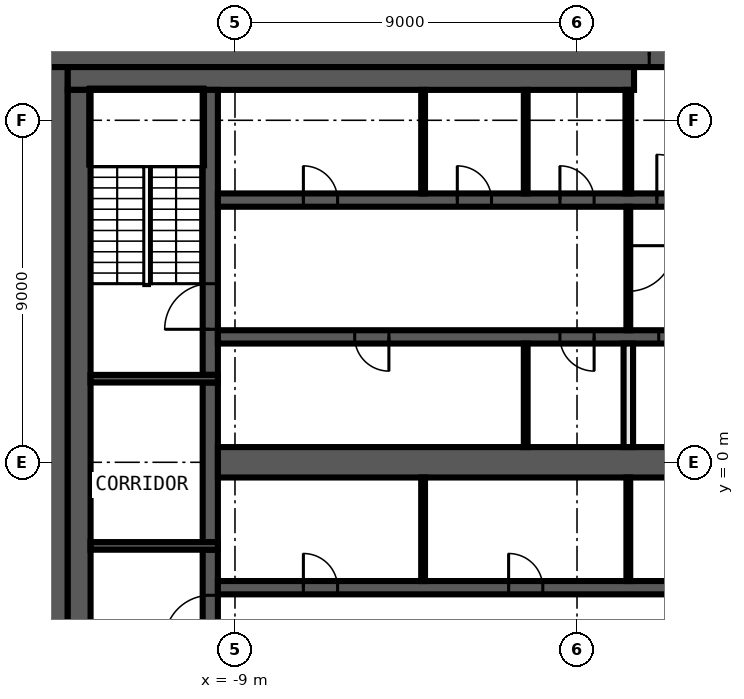
"""IFC4 building model, lengths in metres.
Left out: names, types, materials, properties, quantities, classifications, styles, units other than length and angle.
Written with IfcOpenShell. Run it as: python <this file> out.ifc"""

import sys

from ifc_helpers import new_model, si_unit, direction, frame, frame_2d, origin, place, context, subcontext, project, spatial, rectangle, extrude, element, fill, save


model = new_model("IFC4")
c1 = context("Model", 3, precision=1e-05, world=origin(), true_north=direction((0.0, 1.0)))
c2 = subcontext(c1, "Body", "Model", "MODEL_VIEW")
j1 = project(units=[si_unit("LENGTHUNIT", "METRE"), si_unit("PLANEANGLEUNIT", "RADIAN")], contexts=[c1])
p1 = place(None, origin())
s1 = spatial("IfcSite", under=j1, at=p1, CompositionType="ELEMENT")
p2 = place(p1, origin())
s2 = spatial("IfcBuilding", under=s1, at=p2, CompositionType="ELEMENT")
p3 = place(p2, frame((0.0, 0.0, 319.4)))
s3 = spatial("IfcBuildingStorey", under=s2, at=p3, CompositionType="ELEMENT", Elevation=319.4)
p4 = place(p3, frame((-14.0, 10.7, 0.0), z_axis=(0.0, 0.0, 1.0), x_axis=(1.0, 0.0, 0.0)))
e1 = element("IfcWall", 1, at=p4, inside=s3, PredefinedType="SHEAR", context=c2, shape_type="SweptSolid", body=[
    extrude(rectangle(XDim=28.0, YDim=0.6, at=frame_2d((14.0, 0.0))), origin(), (0.0, 0.0, 1.0), 3.82),
])
p5 = place(p4, frame((15.9, 0.0, 0.0)))
e2 = element("IfcOpeningElement", 2, at=p5, cuts=e1, PredefinedType="OPENING", context=c2, shape_type="SweptSolid", body=[
    extrude(rectangle(XDim=1.6, YDim=2.1, at=frame_2d((0.8, 1.05))), frame((0.0, 0.31, 0.0), z_axis=(0.0, -1.0, 0.0), x_axis=(1.0, 0.0, 0.0)), (0.0, 0.0, 1.0), 0.62),
])
p6 = place(p3, frame((-13.7, -10.4, 0.0), z_axis=(0.0, 0.0, 1.0), x_axis=(0.0, 1.0, 0.0)))
e3 = element("IfcWall", 3, at=p6, inside=s3, PredefinedType="SHEAR", context=c2, shape_type="SweptSolid", body=[
    extrude(rectangle(XDim=20.8, YDim=0.6, at=frame_2d((10.4, 0.0))), origin(), (0.0, 0.0, 1.0), 3.82),
])
p7 = place(p3, frame((-13.4, 10.1, 0.0), z_axis=(0.0, 0.0, 1.0), x_axis=(1.0, 0.0, 0.0)))
e4 = element("IfcWall", 4, at=p7, inside=s3, PredefinedType="SHEAR", context=c2, shape_type="SweptSolid", body=[
    extrude(rectangle(XDim=14.9, YDim=0.6, at=frame_2d((7.45, 0.0))), origin(), (0.0, 0.0, 1.0), 3.82),
])
p8 = place(p3, frame((-13.1, -9.8, 0.0), z_axis=(0.0, 0.0, 1.0), x_axis=(0.0, 1.0, 0.0)))
e5 = element("IfcWall", 5, at=p8, inside=s3, PredefinedType="SHEAR", context=c2, shape_type="SweptSolid", body=[
    extrude(rectangle(XDim=19.6, YDim=0.6, at=frame_2d((9.8, 0.0))), origin(), (0.0, 0.0, 1.0), 3.82),
])
p9 = place(p3, frame((-9.65, -9.8, 0.0), z_axis=(0.0, 0.0, 1.0), x_axis=(0.0, 1.0, 0.0)))
e6 = element("IfcWall", 6, at=p9, inside=s3, PredefinedType="SHEAR", context=c2, shape_type="SweptSolid", body=[
    extrude(rectangle(XDim=7.5, YDim=0.4, at=frame_2d((3.75, 0.0))), origin(), (0.0, 0.0, 1.0), 3.82),
])
p10 = place(p9, frame((5.1, 0.0, 0.0)))
e7 = element("IfcOpeningElement", 7, at=p10, cuts=e6, PredefinedType="OPENING", context=c2, shape_type="SweptSolid", body=[
    extrude(rectangle(XDim=1.2, YDim=2.1, at=frame_2d((0.6, 1.05))), frame((0.0, 0.21, 0.0), z_axis=(0.0, -1.0, 0.0), x_axis=(1.0, 0.0, 0.0)), (0.0, 0.0, 1.0), 0.42),
])
p11 = place(p3, frame((-9.65, -2.1, 0.0), z_axis=(0.0, 0.0, 1.0), x_axis=(0.0, 1.0, 0.0)))
e8 = element("IfcWall", 8, at=p11, inside=s3, PredefinedType="SHEAR", context=c2, shape_type="SweptSolid", body=[
    extrude(rectangle(XDim=4.2, YDim=0.4, at=frame_2d((2.1, 0.0))), origin(), (0.0, 0.0, 1.0), 3.82),
])
p12 = place(p3, frame((-9.65, 2.3, 0.0), z_axis=(0.0, 0.0, 1.0), x_axis=(0.0, 1.0, 0.0)))
e9 = element("IfcWall", 9, at=p12, inside=s3, PredefinedType="SHEAR", context=c2, shape_type="SweptSolid", body=[
    extrude(rectangle(XDim=7.5, YDim=0.4, at=frame_2d((3.75, 0.0))), origin(), (0.0, 0.0, 1.0), 3.82),
])
p13 = place(p12, frame((1.2, 0.0, 0.0)))
e10 = element("IfcOpeningElement", 10, at=p13, cuts=e9, PredefinedType="OPENING", context=c2, shape_type="SweptSolid", body=[
    extrude(rectangle(XDim=1.2, YDim=2.1, at=frame_2d((0.6, 1.05))), frame((0.0, 0.21, 0.0), z_axis=(0.0, -1.0, 0.0), x_axis=(1.0, 0.0, 0.0)), (0.0, 0.0, 1.0), 0.42),
])
for number, where, z_axis, x_axis in (
    (11, (-9.45, 2.2, 0.0), (0.0, 0.0, 1.0), (-1.0, 0.0, 0.0)),
    (12, (-9.45, -2.2, 0.0), (0.0, 0.0, 1.0), (-1.0, 0.0, 0.0)),
):
    element("IfcWall", number, at=place(p3, frame(where, z_axis=z_axis, x_axis=x_axis)), inside=s3, PredefinedType="SHEAR", context=c2, shape_type="SweptSolid", body=[
        extrude(rectangle(XDim=3.35, YDim=0.2, at=frame_2d((1.675, 0.0))), origin(), (0.0, 0.0, 1.0), 3.82),
    ])
p14 = place(p3, frame((-9.45, 6.9, 0.0), z_axis=(0.0, 0.0, 1.0), x_axis=(1.0, 0.0, 0.0)))
e13 = element("IfcWall", 13, at=p14, inside=s3, PredefinedType="SHEAR", context=c2, shape_type="SweptSolid", body=[
    extrude(rectangle(XDim=18.9, YDim=0.35, at=frame_2d((9.45, 0.0))), origin(), (0.0, 0.0, 1.0), 3.82),
])
p15 = place(p14, frame((11.55, 0.0, 0.0)))
e14 = element("IfcOpeningElement", 14, at=p15, cuts=e13, PredefinedType="OPENING", context=c2, shape_type="SweptSolid", body=[
    extrude(rectangle(XDim=1.2, YDim=2.1, at=frame_2d((0.6, 1.05))), frame((0.0, 0.185, 0.0), z_axis=(0.0, -1.0, 0.0), x_axis=(1.0, 0.0, 0.0)), (0.0, 0.0, 1.0), 0.37),
])
p16 = place(p14, frame((14.3, 0.0, 0.0)))
e15 = element("IfcOpeningElement", 15, at=p16, cuts=e13, PredefinedType="OPENING", context=c2, shape_type="SweptSolid", body=[
    extrude(rectangle(XDim=1.1, YDim=2.1, at=frame_2d((0.55, 1.05))), frame((0.0, 0.185, 0.0), z_axis=(0.0, -1.0, 0.0), x_axis=(1.0, 0.0, 0.0)), (0.0, 0.0, 1.0), 0.37),
])
p17 = place(p14, frame((17.0, 0.0, 0.0)))
e16 = element("IfcOpeningElement", 16, at=p17, cuts=e13, PredefinedType="OPENING", context=c2, shape_type="SweptSolid", body=[
    extrude(rectangle(XDim=1.1, YDim=2.1, at=frame_2d((0.55, 1.05))), frame((0.0, 0.185, 0.0), z_axis=(0.0, -1.0, 0.0), x_axis=(1.0, 0.0, 0.0)), (0.0, 0.0, 1.0), 0.37),
])
p18 = place(p14, frame((2.25, 0.0, 0.0)))
e17 = element("IfcOpeningElement", 17, at=p18, cuts=e13, PredefinedType="OPENING", context=c2, shape_type="SweptSolid", body=[
    extrude(rectangle(XDim=0.9, YDim=2.1, at=frame_2d((0.45, 1.05))), frame((0.0, 0.185, 0.0), z_axis=(0.0, -1.0, 0.0), x_axis=(1.0, 0.0, 0.0)), (0.0, 0.0, 1.0), 0.37),
])
p19 = place(p14, frame((6.3, 0.0, 0.0)))
e18 = element("IfcOpeningElement", 18, at=p19, cuts=e13, PredefinedType="OPENING", context=c2, shape_type="SweptSolid", body=[
    extrude(rectangle(XDim=0.9, YDim=2.1, at=frame_2d((0.45, 1.05))), frame((0.0, 0.185, 0.0), z_axis=(0.0, -1.0, 0.0), x_axis=(1.0, 0.0, 0.0)), (0.0, 0.0, 1.0), 0.37),
])
p20 = place(p14, frame((9.0, 0.0, 0.0)))
e19 = element("IfcOpeningElement", 19, at=p20, cuts=e13, PredefinedType="OPENING", context=c2, shape_type="SweptSolid", body=[
    extrude(rectangle(XDim=0.9, YDim=2.1, at=frame_2d((0.45, 1.05))), frame((0.0, 0.185, 0.0), z_axis=(0.0, -1.0, 0.0), x_axis=(1.0, 0.0, 0.0)), (0.0, 0.0, 1.0), 0.37),
])
p21 = place(p3, frame((9.45, 3.3, 0.0), z_axis=(0.0, 0.0, 1.0), x_axis=(-1.0, 0.0, 0.0)))
e20 = element("IfcWall", 20, at=p21, inside=s3, PredefinedType="SHEAR", context=c2, shape_type="SweptSolid", body=[
    extrude(rectangle(XDim=18.9, YDim=0.35, at=frame_2d((9.45, 0.0))), origin(), (0.0, 0.0, 1.0), 3.82),
])
p22 = place(p21, frame((6.2, 0.0, 0.0)))
e21 = element("IfcOpeningElement", 21, at=p22, cuts=e20, PredefinedType="OPENING", context=c2, shape_type="SweptSolid", body=[
    extrude(rectangle(XDim=1.1, YDim=2.1, at=frame_2d((0.55, 1.05))), frame((0.0, 0.185, 0.0), z_axis=(0.0, -1.0, 0.0), x_axis=(1.0, 0.0, 0.0)), (0.0, 0.0, 1.0), 0.37),
])
p23 = place(p21, frame((3.5, 0.0, 0.0)))
e22 = element("IfcOpeningElement", 22, at=p23, cuts=e20, PredefinedType="OPENING", context=c2, shape_type="SweptSolid", body=[
    extrude(rectangle(XDim=1.1, YDim=2.1, at=frame_2d((0.55, 1.05))), frame((0.0, 0.185, 0.0), z_axis=(0.0, -1.0, 0.0), x_axis=(1.0, 0.0, 0.0)), (0.0, 0.0, 1.0), 0.37),
])
p24 = place(p21, frame((0.9, 0.0, 0.0)))
e23 = element("IfcOpeningElement", 23, at=p24, cuts=e20, PredefinedType="OPENING", context=c2, shape_type="SweptSolid", body=[
    extrude(rectangle(XDim=0.9, YDim=2.1, at=frame_2d((0.45, 1.05))), frame((0.0, 0.185, 0.0), z_axis=(0.0, -1.0, 0.0), x_axis=(1.0, 0.0, 0.0)), (0.0, 0.0, 1.0), 0.37),
])
p25 = place(p21, frame((14.4, 0.0, 0.0)))
e24 = element("IfcOpeningElement", 24, at=p25, cuts=e20, PredefinedType="OPENING", context=c2, shape_type="SweptSolid", body=[
    extrude(rectangle(XDim=0.9, YDim=2.1, at=frame_2d((0.45, 1.05))), frame((0.0, 0.185, 0.0), z_axis=(0.0, -1.0, 0.0), x_axis=(1.0, 0.0, 0.0)), (0.0, 0.0, 1.0), 0.37),
])
p26 = place(p21, frame((9.0, 0.0, 0.0)))
e25 = element("IfcOpeningElement", 25, at=p26, cuts=e20, PredefinedType="OPENING", context=c2, shape_type="SweptSolid", body=[
    extrude(rectangle(XDim=0.9, YDim=2.1, at=frame_2d((0.45, 1.05))), frame((0.0, 0.185, 0.0), z_axis=(0.0, -1.0, 0.0), x_axis=(1.0, 0.0, 0.0)), (0.0, 0.0, 1.0), 0.37),
])
p27 = place(p3, frame((-9.45, -3.3, 0.0), z_axis=(0.0, 0.0, 1.0), x_axis=(1.0, 0.0, 0.0)))
e26 = element("IfcWall", 26, at=p27, inside=s3, PredefinedType="SHEAR", context=c2, shape_type="SweptSolid", body=[
    extrude(rectangle(XDim=18.9, YDim=0.35, at=frame_2d((9.45, 0.0))), origin(), (0.0, 0.0, 1.0), 3.82),
])
p28 = place(p27, frame((17.0, 0.0, 0.0)))
e27 = element("IfcOpeningElement", 27, at=p28, cuts=e26, PredefinedType="OPENING", context=c2, shape_type="SweptSolid", body=[
    extrude(rectangle(XDim=1.1, YDim=2.1, at=frame_2d((0.55, 1.05))), frame((0.0, 0.185, 0.0), z_axis=(0.0, -1.0, 0.0), x_axis=(1.0, 0.0, 0.0)), (0.0, 0.0, 1.0), 0.37),
])
p29 = place(p27, frame((2.25, 0.0, 0.0)))
e28 = element("IfcOpeningElement", 28, at=p29, cuts=e26, PredefinedType="OPENING", context=c2, shape_type="SweptSolid", body=[
    extrude(rectangle(XDim=0.9, YDim=2.1, at=frame_2d((0.45, 1.05))), frame((0.0, 0.185, 0.0), z_axis=(0.0, -1.0, 0.0), x_axis=(1.0, 0.0, 0.0)), (0.0, 0.0, 1.0), 0.37),
])
p30 = place(p27, frame((7.65, 0.0, 0.0)))
e29 = element("IfcOpeningElement", 29, at=p30, cuts=e26, PredefinedType="OPENING", context=c2, shape_type="SweptSolid", body=[
    extrude(rectangle(XDim=0.9, YDim=2.1, at=frame_2d((0.45, 1.05))), frame((0.0, 0.185, 0.0), z_axis=(0.0, -1.0, 0.0), x_axis=(1.0, 0.0, 0.0)), (0.0, 0.0, 1.0), 0.37),
])
p31 = place(p27, frame((13.05, 0.0, 0.0)))
e30 = element("IfcOpeningElement", 30, at=p31, cuts=e26, PredefinedType="OPENING", context=c2, shape_type="SweptSolid", body=[
    extrude(rectangle(XDim=0.9, YDim=2.1, at=frame_2d((0.45, 1.05))), frame((0.0, 0.185, 0.0), z_axis=(0.0, -1.0, 0.0), x_axis=(1.0, 0.0, 0.0)), (0.0, 0.0, 1.0), 0.37),
])
p32 = place(p3, frame((-9.45, 0.0, 0.0), z_axis=(0.0, 0.0, 1.0), x_axis=(1.0, 0.0, 0.0)))
e31 = element("IfcWall", 31, at=p32, inside=s3, PredefinedType="SHEAR", context=c2, shape_type="SweptSolid", body=[
    extrude(rectangle(XDim=18.9, YDim=0.8, at=frame_2d((9.45, 0.0))), origin(), (0.0, 0.0, 1.0), 3.82),
])
p33 = place(p3, frame((1.35, 7.075, 0.0), z_axis=(0.0, 0.0, 1.0), x_axis=(0.0, 1.0, 0.0)))
e32 = element("IfcWall", 32, at=p33, inside=s3, PredefinedType="PARTITIONING", context=c2, shape_type="SweptSolid", body=[
    extrude(rectangle(XDim=2.725, YDim=0.15, at=frame_2d((1.363, 0.0))), origin(), (0.0, 0.0, 1.0), 3.82),
])
p34 = place(p3, frame((1.35, -3.125, 0.0), z_axis=(0.0, 0.0, 1.0), x_axis=(0.0, 1.0, 0.0)))
e33 = element("IfcWall", 33, at=p34, inside=s3, PredefinedType="PARTITIONING", context=c2, shape_type="SweptSolid", body=[
    extrude(rectangle(XDim=2.725, YDim=0.1, at=frame_2d((1.363, 0.0))), origin(), (0.0, 0.0, 1.0), 3.82),
])
p35 = place(p3, frame((1.35, 6.725, 0.0), z_axis=(0.0, 0.0, 1.0), x_axis=(0.0, -1.0, 0.0)))
e34 = element("IfcWall", 34, at=p35, inside=s3, PredefinedType="PARTITIONING", context=c2, shape_type="SweptSolid", body=[
    extrude(rectangle(XDim=3.25, YDim=0.1, at=frame_2d((1.625, 0.0))), origin(), (0.0, 0.0, 1.0), 3.82),
])
p36 = place(p35, frame((1.025, 0.0, 0.0)))
e35 = element("IfcOpeningElement", 35, at=p36, cuts=e34, PredefinedType="OPENING", context=c2, shape_type="SweptSolid", body=[
    extrude(rectangle(XDim=1.2, YDim=2.1, at=frame_2d((0.6, 1.05))), frame((0.0, 0.06, 0.0), z_axis=(0.0, -1.0, 0.0), x_axis=(1.0, 0.0, 0.0)), (0.0, 0.0, 1.0), 0.12),
])
p37 = place(p3, frame((1.35, 0.4, 0.0), z_axis=(0.0, 0.0, 1.0), x_axis=(0.0, 1.0, 0.0)))
e36 = element("IfcWall", 36, at=p37, inside=s3, PredefinedType="SOLIDWALL", context=c2, shape_type="SweptSolid", body=[
    extrude(rectangle(XDim=2.725, YDim=0.25, at=frame_2d((1.363, 0.0))), origin(), (0.0, 0.0, 1.0), 3.82),
])
for number, where, z_axis, x_axis in (
    (37, (-1.35, 0.4, 0.0), (0.0, 0.0, 1.0), (0.0, 1.0, 0.0)),
    (38, (-1.35, 7.075, 0.0), (0.0, 0.0, 1.0), (0.0, 1.0, 0.0)),
    (39, (-4.05, -3.125, 0.0), (0.0, 0.0, 1.0), (0.0, 1.0, 0.0)),
    (40, (-4.05, 7.075, 0.0), (0.0, 0.0, 1.0), (0.0, 1.0, 0.0)),
):
    element("IfcWall", number, at=place(p3, frame(where, z_axis=z_axis, x_axis=x_axis)), inside=s3, PredefinedType="PARTITIONING", context=c2, shape_type="SweptSolid", body=[
        extrude(rectangle(XDim=2.725, YDim=0.1, at=frame_2d((1.363, 0.0))), origin(), (0.0, 0.0, 1.0), 3.82),
    ])
p38 = place(p5, origin())
e41 = element("IfcDoor", 41, at=p38, inside=s3, OperationType="DOUBLE_DOOR_SINGLE_SWING", PredefinedType="DOOR", context=c2, shape_type="SweptSolid", body=[
    extrude(rectangle(XDim=1.6, YDim=2.1, at=frame_2d((0.8, 1.05))), frame((0.0, 0.025, 0.0), z_axis=(0.0, -1.0, 0.0), x_axis=(1.0, 0.0, 0.0)), (0.0, 0.0, 1.0), 0.05),
])
fill(e2, e41)
p39 = place(p15, origin())
e42 = element("IfcDoor", 42, at=p39, inside=s3, OperationType="SINGLE_SWING_LEFT", PredefinedType="DOOR", context=c2, shape_type="SweptSolid", body=[
    extrude(rectangle(XDim=1.2, YDim=2.1, at=frame_2d((0.6, 1.05))), frame((0.0, 0.025, 0.0), z_axis=(0.0, -1.0, 0.0), x_axis=(1.0, 0.0, 0.0)), (0.0, 0.0, 1.0), 0.05),
])
fill(e14, e42)
p40 = place(p22, origin())
e43 = element("IfcDoor", 43, at=p40, inside=s3, OperationType="DOUBLE_DOOR_SLIDING", PredefinedType="DOOR", context=c2, shape_type="SweptSolid", body=[
    extrude(rectangle(XDim=1.1, YDim=2.1, at=frame_2d((0.55, 1.05))), frame((0.0, 0.025, 0.0), z_axis=(0.0, -1.0, 0.0), x_axis=(1.0, 0.0, 0.0)), (0.0, 0.0, 1.0), 0.05),
])
fill(e21, e43)
p41 = place(p18, origin())
e44 = element("IfcDoor", 44, at=p41, inside=s3, OperationType="SINGLE_SWING_RIGHT", PredefinedType="DOOR", context=c2, shape_type="SweptSolid", body=[
    extrude(rectangle(XDim=0.9, YDim=2.1, at=frame_2d((0.45, 1.05))), frame((0.0, 0.025, 0.0), z_axis=(0.0, -1.0, 0.0), x_axis=(1.0, 0.0, 0.0)), (0.0, 0.0, 1.0), 0.05),
])
fill(e17, e44)
p42 = place(p19, origin())
e45 = element("IfcDoor", 45, at=p42, inside=s3, OperationType="SINGLE_SWING_LEFT", PredefinedType="DOOR", context=c2, shape_type="SweptSolid", body=[
    extrude(rectangle(XDim=0.9, YDim=2.1, at=frame_2d((0.45, 1.05))), frame((0.0, 0.025, 0.0), z_axis=(0.0, -1.0, 0.0), x_axis=(1.0, 0.0, 0.0)), (0.0, 0.0, 1.0), 0.05),
])
fill(e18, e45)
p43 = place(p20, origin())
e46 = element("IfcDoor", 46, at=p43, inside=s3, OperationType="SINGLE_SWING_RIGHT", PredefinedType="DOOR", context=c2, shape_type="SweptSolid", body=[
    extrude(rectangle(XDim=0.9, YDim=2.1, at=frame_2d((0.45, 1.05))), frame((0.0, 0.025, 0.0), z_axis=(0.0, -1.0, 0.0), x_axis=(1.0, 0.0, 0.0)), (0.0, 0.0, 1.0), 0.05),
])
fill(e19, e46)
p44 = place(p25, origin())
e47 = element("IfcDoor", 47, at=p44, inside=s3, OperationType="SINGLE_SWING_LEFT", PredefinedType="DOOR", context=c2, shape_type="SweptSolid", body=[
    extrude(rectangle(XDim=0.9, YDim=2.1, at=frame_2d((0.45, 1.05))), frame((0.0, 0.025, 0.0), z_axis=(0.0, -1.0, 0.0), x_axis=(1.0, 0.0, 0.0)), (0.0, 0.0, 1.0), 0.05),
])
fill(e24, e47)
p45 = place(p26, origin())
e48 = element("IfcDoor", 48, at=p45, inside=s3, OperationType="SINGLE_SWING_RIGHT", PredefinedType="DOOR", context=c2, shape_type="SweptSolid", body=[
    extrude(rectangle(XDim=0.9, YDim=2.1, at=frame_2d((0.45, 1.05))), frame((0.0, 0.025, 0.0), z_axis=(0.0, -1.0, 0.0), x_axis=(1.0, 0.0, 0.0)), (0.0, 0.0, 1.0), 0.05),
])
fill(e25, e48)
p46 = place(p29, origin())
e49 = element("IfcDoor", 49, at=p46, inside=s3, OperationType="SINGLE_SWING_LEFT", PredefinedType="DOOR", context=c2, shape_type="SweptSolid", body=[
    extrude(rectangle(XDim=0.9, YDim=2.1, at=frame_2d((0.45, 1.05))), frame((0.0, 0.025, 0.0), z_axis=(0.0, -1.0, 0.0), x_axis=(1.0, 0.0, 0.0)), (0.0, 0.0, 1.0), 0.05),
])
fill(e28, e49)
p47 = place(p30, origin())
e50 = element("IfcDoor", 50, at=p47, inside=s3, OperationType="SINGLE_SWING_RIGHT", PredefinedType="DOOR", context=c2, shape_type="SweptSolid", body=[
    extrude(rectangle(XDim=0.9, YDim=2.1, at=frame_2d((0.45, 1.05))), frame((0.0, 0.025, 0.0), z_axis=(0.0, -1.0, 0.0), x_axis=(1.0, 0.0, 0.0)), (0.0, 0.0, 1.0), 0.05),
])
fill(e29, e50)
p48 = place(p13, origin())
e51 = element("IfcDoor", 51, at=p48, inside=s3, OperationType="SINGLE_SWING_RIGHT", PredefinedType="DOOR", context=c2, shape_type="SweptSolid", body=[
    extrude(rectangle(XDim=1.2, YDim=2.1, at=frame_2d((0.6, 1.05))), frame((0.0, 0.025, 0.0), z_axis=(0.0, -1.0, 0.0), x_axis=(1.0, 0.0, 0.0)), (0.0, 0.0, 1.0), 0.05),
])
fill(e10, e51)
p49 = place(p10, origin())
e52 = element("IfcDoor", 52, at=p49, inside=s3, OperationType="SINGLE_SWING_LEFT", PredefinedType="DOOR", context=c2, shape_type="SweptSolid", body=[
    extrude(rectangle(XDim=1.2, YDim=2.1, at=frame_2d((0.6, 1.05))), frame((0.0, 0.025, 0.0), z_axis=(0.0, -1.0, 0.0), x_axis=(1.0, 0.0, 0.0)), (0.0, 0.0, 1.0), 0.05),
])
fill(e7, e52)
p50 = place(p36, origin())
e53 = element("IfcDoor", 53, at=p50, inside=s3, OperationType="SINGLE_SWING_LEFT", PredefinedType="DOOR", context=c2, shape_type="SweptSolid", body=[
    extrude(rectangle(XDim=1.2, YDim=2.1, at=frame_2d((0.6, 1.05))), frame((0.0, 0.025, 0.0), z_axis=(0.0, -1.0, 0.0), x_axis=(1.0, 0.0, 0.0)), (0.0, 0.0, 1.0), 0.05),
])
fill(e35, e53)
save(model, sys.argv[1])
